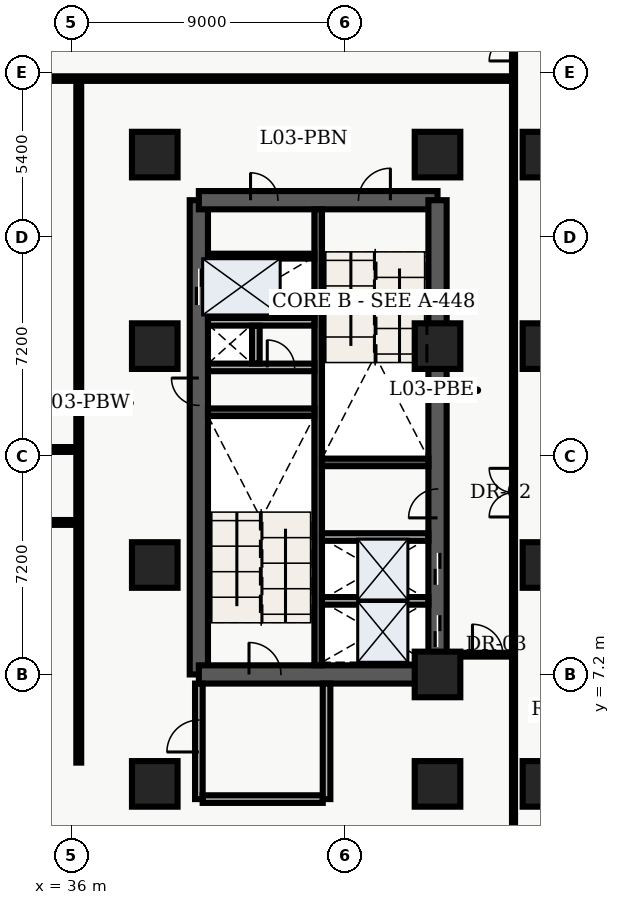
"""IFC4 building model, lengths in metres.
Left out: names, types, materials, properties, quantities, classifications, styles, units other than length and angle.
Written with IfcOpenShell. Run it as: python <this file> out.ifc"""

import sys

from ifc_helpers import new_model, entity, si_unit, converted_unit, direction, frame, origin_with_axes, origin_2d_with_axis, place, context, subcontext, project, spatial, polyline, rectangle, outline, extrude, element, fill, save


model = new_model("IFC4")
c1 = context("Model", 3, precision=1e-05, world=origin_with_axes(), true_north=direction((0.0, 1.0)))
c2 = subcontext(c1, "Body", "Model", "MODEL_VIEW")
j1 = project(units=[si_unit("LENGTHUNIT", "METRE"), converted_unit("PLANEANGLEUNIT", "DEGREE", entity("IfcPlaneAngleMeasure", 0.017), si_unit("PLANEANGLEUNIT", "RADIAN"), dimensions=[0, 0, 0, 0, 0, 0, 0])], contexts=[c1])
p1 = place(None, origin_with_axes())
s1 = spatial("IfcSite", under=j1, at=p1, CompositionType="ELEMENT")
p2 = place(p1, origin_with_axes())
s2 = spatial("IfcBuilding", under=s1, at=p2, CompositionType="ELEMENT")
p3 = place(p2, frame((0.0, 0.0, 15.3), z_axis=(0.0, 0.0, 1.0), x_axis=(1.0, 0.0, 0.0)))
s3 = spatial("IfcBuildingStorey", under=s2, at=p3, CompositionType="ELEMENT", Elevation=15.3)
p4 = place(p3, frame((40.2, 7.2, 0.0), z_axis=(0.0, 0.0, 1.0), x_axis=(0.0, 1.0, 0.0)))
e1 = element("IfcWall", 1, at=p4, inside=s3, PredefinedType="SHEAR", context=c2, shape_type="SweptSolid", body=[
    extrude(outline(polyline([(0.0, -0.3), (15.6, -0.3), (15.6, 0.3), (0.0, 0.3), (0.0, -0.3)])), origin_with_axes(), (0.0, 0.0, 1.0), 4.26),
])
p5 = place(p4, frame((12.75, 0.0, 0.0), z_axis=(0.0, 0.0, 1.0), x_axis=(1.0, 0.0, 0.0)))
e2 = element("IfcOpeningElement", 2, at=p5, cuts=e1, PredefinedType="OPENING", context=c2, shape_type="SweptSolid", body=[
    extrude(rectangle(XDim=1.2, YDim=0.62, at=origin_2d_with_axis()), origin_with_axes(), (0.0, 0.0, 1.0), 2.15),
])
p6 = place(p4, frame((9.3, 0.0, 0.0), z_axis=(0.0, 0.0, 1.0), x_axis=(1.0, 0.0, 0.0)))
e3 = element("IfcOpeningElement", 3, at=p6, cuts=e1, PredefinedType="OPENING", context=c2, shape_type="SweptSolid", body=[
    extrude(rectangle(XDim=0.9, YDim=0.62, at=origin_2d_with_axis()), origin_with_axes(), (0.0, 0.0, 1.0), 2.15),
])
p7 = place(p3, frame((40.2, 7.2, 0.0), z_axis=(0.0, 0.0, 1.0), x_axis=(1.0, 0.0, 0.0)))
e4 = element("IfcWall", 4, at=p7, inside=s3, PredefinedType="SHEAR", context=c2, shape_type="SweptSolid", body=[
    extrude(outline(polyline([(0.0, -0.3), (7.85, -0.3), (7.85, 0.3), (0.0, 0.3), (0.0, -0.3)])), origin_with_axes(), (0.0, 0.0, 1.0), 4.26),
])
p8 = place(p7, frame((2.175, 0.0, 0.0), z_axis=(0.0, 0.0, 1.0), x_axis=(1.0, 0.0, 0.0)))
e5 = element("IfcOpeningElement", 5, at=p8, cuts=e4, PredefinedType="OPENING", context=c2, shape_type="SweptSolid", body=[
    extrude(rectangle(XDim=1.05, YDim=0.62, at=origin_2d_with_axis()), origin_with_axes(), (0.0, 0.0, 1.0), 2.15),
])
p9 = place(p3, frame((40.2, 22.8, 0.0), z_axis=(0.0, 0.0, 1.0), x_axis=(1.0, 0.0, 0.0)))
e6 = element("IfcWall", 6, at=p9, inside=s3, PredefinedType="SHEAR", context=c2, shape_type="SweptSolid", body=[
    extrude(outline(polyline([(0.0, -0.3), (7.85, -0.3), (7.85, 0.3), (0.0, 0.3), (0.0, -0.3)])), origin_with_axes(), (0.0, 0.0, 1.0), 4.26),
])
p10 = place(p9, frame((5.775, 0.0, 0.0), z_axis=(0.0, 0.0, 1.0), x_axis=(1.0, 0.0, 0.0)))
e7 = element("IfcOpeningElement", 7, at=p10, cuts=e6, PredefinedType="OPENING", context=c2, shape_type="SweptSolid", body=[
    extrude(rectangle(XDim=1.05, YDim=0.62, at=origin_2d_with_axis()), origin_with_axes(), (0.0, 0.0, 1.0), 2.15),
])
p11 = place(p9, frame((2.15, 0.0, 0.0), z_axis=(0.0, 0.0, 1.0), x_axis=(1.0, 0.0, 0.0)))
e8 = element("IfcOpeningElement", 8, at=p11, cuts=e6, PredefinedType="OPENING", context=c2, shape_type="SweptSolid", body=[
    extrude(rectangle(XDim=0.9, YDim=0.62, at=origin_2d_with_axis()), origin_with_axes(), (0.0, 0.0, 1.0), 2.15),
])
p12 = place(p3, frame((48.05, 7.2, 0.0), z_axis=(0.0, 0.0, 1.0), x_axis=(0.0, 1.0, 0.0)))
e9 = element("IfcWall", 9, at=p12, inside=s3, PredefinedType="SHEAR", context=c2, shape_type="SweptSolid", body=[
    extrude(outline(polyline([(0.0, -0.3), (15.6, -0.3), (15.6, 0.3), (0.0, 0.3), (0.0, -0.3)])), origin_with_axes(), (0.0, 0.0, 1.0), 4.26),
])
p13 = place(p12, frame((1.425, 0.0, 0.0), z_axis=(0.0, 0.0, 1.0), x_axis=(1.0, 0.0, 0.0)))
e10 = element("IfcOpeningElement", 10, at=p13, cuts=e9, PredefinedType="OPENING", context=c2, shape_type="SweptSolid", body=[
    extrude(rectangle(XDim=1.05, YDim=0.62, at=origin_2d_with_axis()), origin_with_axes(), (0.0, 0.0, 1.0), 2.15),
])
p14 = place(p12, frame((3.475, 0.0, 0.0), z_axis=(0.0, 0.0, 1.0), x_axis=(1.0, 0.0, 0.0)))
e11 = element("IfcOpeningElement", 11, at=p14, cuts=e9, PredefinedType="OPENING", context=c2, shape_type="SweptSolid", body=[
    extrude(rectangle(XDim=1.05, YDim=0.62, at=origin_2d_with_axis()), origin_with_axes(), (0.0, 0.0, 1.0), 2.15),
])
p15 = place(p12, frame((5.625, 0.0, 0.0), z_axis=(0.0, 0.0, 1.0), x_axis=(1.0, 0.0, 0.0)))
e12 = element("IfcOpeningElement", 12, at=p15, cuts=e9, PredefinedType="OPENING", context=c2, shape_type="SweptSolid", body=[
    extrude(rectangle(XDim=0.95, YDim=0.62, at=origin_2d_with_axis()), origin_with_axes(), (0.0, 0.0, 1.0), 2.15),
])
p16 = place(p3, frame((44.125, 7.5, 0.0), z_axis=(0.0, 0.0, 1.0), x_axis=(0.0, 1.0, 0.0)))
e13 = element("IfcWall", 13, at=p16, inside=s3, PredefinedType="SHEAR", context=c2, shape_type="SweptSolid", body=[
    extrude(outline(polyline([(0.0, -0.125), (15.0, -0.125), (15.0, 0.125), (0.0, 0.125), (0.0, -0.125)])), origin_with_axes(), (0.0, 0.0, 1.0), 4.26),
])
for number, where, z_axis, x_axis in (
    (14, (40.5, 15.825, 0.0), (0.0, 0.0, 1.0), (1.0, 0.0, 0.0)),
    (15, (44.25, 14.175, 0.0), (0.0, 0.0, 1.0), (1.0, 0.0, 0.0)),
):
    element("IfcWall", number, at=place(p3, frame(where, z_axis=z_axis, x_axis=x_axis)), inside=s3, PredefinedType="SHEAR", context=c2, shape_type="SweptSolid", body=[
        extrude(outline(polyline([(0.0, -0.125), (3.5, -0.125), (3.5, 0.125), (0.0, 0.125), (0.0, -0.125)])), origin_with_axes(), (0.0, 0.0, 1.0), 4.26),
    ])
p17 = place(p3, frame((40.5, 17.3, 0.0), z_axis=(0.0, 0.0, 1.0), x_axis=(1.0, 0.0, 0.0)))
e16 = element("IfcWall", 16, at=p17, inside=s3, PredefinedType="SOLIDWALL", context=c2, shape_type="SweptSolid", body=[
    extrude(outline(polyline([(0.0, -0.125), (3.5, -0.125), (3.5, 0.125), (0.0, 0.125), (0.0, -0.125)])), origin_with_axes(), (0.0, 0.0, 1.0), 3.3),
])
p18 = place(p17, frame((2.4, 0.0, 0.0), z_axis=(0.0, 0.0, 1.0), x_axis=(1.0, 0.0, 0.0)))
e17 = element("IfcOpeningElement", 17, at=p18, cuts=e16, PredefinedType="OPENING", context=c2, shape_type="SweptSolid", body=[
    extrude(rectangle(XDim=0.9, YDim=0.27, at=origin_2d_with_axis()), origin_with_axes(), (0.0, 0.0, 1.0), 2.15),
])
p19 = place(p3, frame((40.5, 18.8, 0.0), z_axis=(0.0, 0.0, 1.0), x_axis=(1.0, 0.0, 0.0)))
e18 = element("IfcWall", 18, at=p19, inside=s3, PredefinedType="SOLIDWALL", context=c2, shape_type="SweptSolid", body=[
    extrude(outline(polyline([(0.0, -0.125), (3.5, -0.125), (3.5, 0.125), (0.0, 0.125), (0.0, -0.125)])), origin_with_axes(), (0.0, 0.0, 1.0), 3.3),
])
p20 = place(p3, frame((42.075, 17.43, 0.0), z_axis=(0.0, 0.0, 1.0), x_axis=(0.0, 1.0, 0.0)))
e19 = element("IfcWall", 19, at=p20, inside=s3, PredefinedType="SOLIDWALL", context=c2, shape_type="SweptSolid", body=[
    extrude(outline(polyline([(0.0, -0.125), (1.24, -0.125), (1.24, 0.125), (0.0, 0.125), (0.0, -0.125)])), origin_with_axes(), (0.0, 0.0, 1.0), 3.3),
])
p21 = place(p3, frame((40.2, 3.1, 0.0), z_axis=(0.0, 0.0, 1.0), x_axis=(0.0, 1.0, 0.0)))
e20 = element("IfcWall", 20, at=p21, inside=s3, PredefinedType="SOLIDWALL", context=c2, shape_type="SweptSolid", body=[
    extrude(outline(polyline([(0.0, -0.125), (3.8, -0.125), (3.8, 0.125), (0.0, 0.125), (0.0, -0.125)])), origin_with_axes(), (0.0, 0.0, 1.0), 3.3),
])
p22 = place(p21, frame((2.075, 0.0, 0.0), z_axis=(0.0, 0.0, 1.0), x_axis=(1.0, 0.0, 0.0)))
e21 = element("IfcOpeningElement", 21, at=p22, cuts=e20, PredefinedType="OPENING", context=c2, shape_type="SweptSolid", body=[
    extrude(rectangle(XDim=1.05, YDim=0.27, at=origin_2d_with_axis()), origin_with_axes(), (0.0, 0.0, 1.0), 2.15),
])
p23 = place(p3, frame((40.325, 3.1, 0.0), z_axis=(0.0, 0.0, 1.0), x_axis=(1.0, 0.0, 0.0)))
e22 = element("IfcWall", 22, at=p23, inside=s3, PredefinedType="SOLIDWALL", context=c2, shape_type="SweptSolid", body=[
    extrude(outline(polyline([(0.0, -0.125), (3.95, -0.125), (3.95, 0.125), (0.0, 0.125), (0.0, -0.125)])), origin_with_axes(), (0.0, 0.0, 1.0), 3.3),
])
p24 = place(p3, frame((44.4, 3.1, 0.0), z_axis=(0.0, 0.0, 1.0), x_axis=(0.0, 1.0, 0.0)))
e23 = element("IfcWall", 23, at=p24, inside=s3, PredefinedType="SOLIDWALL", context=c2, shape_type="SweptSolid", body=[
    extrude(outline(polyline([(0.0, -0.125), (3.8, -0.125), (3.8, 0.125), (0.0, 0.125), (0.0, -0.125)])), origin_with_axes(), (0.0, 0.0, 1.0), 3.3),
])
for number, where, z_axis, x_axis in (
    (24, (38.75, 3.6, 0.0), (0.0, 0.0, 1.0), (1.0, 0.0, 0.0)),
    (25, (38.75, 10.8, 0.0), (0.0, 0.0, 1.0), (1.0, 0.0, 0.0)),
    (26, (38.75, 18.0, 0.0), (0.0, 0.0, 1.0), (1.0, 0.0, 0.0)),
    (27, (38.75, 24.3, 0.0), (0.0, 0.0, 1.0), (1.0, 0.0, 0.0)),
    (28, (48.05, 3.6, 0.0), (0.0, 0.0, 1.0), (1.0, 0.0, 0.0)),
    (29, (48.05, 7.2, 0.0), (0.0, 0.0, 1.0), (1.0, 0.0, 0.0)),
    (30, (48.05, 18.0, 0.0), (0.0, 0.0, 1.0), (1.0, 0.0, 0.0)),
    (31, (48.05, 24.3, 0.0), (0.0, 0.0, 1.0), (1.0, 0.0, 0.0)),
    (32, (51.6, 3.6, 0.0), (0.0, 0.0, 1.0), (1.0, 0.0, 0.0)),
    (33, (51.6, 10.8, 0.0), (0.0, 0.0, 1.0), (1.0, 0.0, 0.0)),
    (34, (51.6, 18.0, 0.0), (0.0, 0.0, 1.0), (1.0, 0.0, 0.0)),
    (35, (51.6, 24.3, 0.0), (0.0, 0.0, 1.0), (1.0, 0.0, 0.0)),
):
    element("IfcColumn", number, at=place(p3, frame(where, z_axis=z_axis, x_axis=x_axis)), inside=s3, PredefinedType="COLUMN", context=c2, shape_type="SweptSolid", body=[
        extrude(rectangle(XDim=1.5, YDim=1.5, at=origin_2d_with_axis()), origin_with_axes(), (0.0, 0.0, 1.0), 4.5),
    ])
p25 = place(p3, frame((40.5, 20.96, 0.0), z_axis=(0.0, 0.0, 1.0), x_axis=(1.0, 0.0, 0.0)))
e36 = element("IfcWall", 36, at=p25, inside=s3, PredefinedType="PARTITIONING", context=c2, shape_type="SweptSolid", body=[
    extrude(outline(polyline([(0.0, -0.08), (3.5, -0.08), (3.5, 0.08), (0.0, 0.08), (0.0, -0.08)])), origin_with_axes(), (0.0, 0.0, 1.0), 3.2),
])
for number, where, z_axis, x_axis in (
    (37, (44.25, 9.62, 0.0), (0.0, 0.0, 1.0), (1.0, 0.0, 0.0)),
    (38, (44.25, 11.72, 0.0), (0.0, 0.0, 1.0), (1.0, 0.0, 0.0)),
):
    element("IfcWall", number, at=place(p3, frame(where, z_axis=z_axis, x_axis=x_axis)), inside=s3, PredefinedType="SOLIDWALL", context=c2, shape_type="SweptSolid", body=[
        extrude(outline(polyline([(0.0, -0.125), (3.5, -0.125), (3.5, 0.125), (0.0, 0.125), (0.0, -0.125)])), origin_with_axes(), (0.0, 0.0, 1.0), 3.2),
    ])
p26 = place(p3, frame((21.3, 12.2, 0.0), z_axis=(0.0, 0.0, 1.0), x_axis=(1.0, 0.0, 0.0)))
e39 = element("IfcWall", 39, at=p26, inside=s3, PredefinedType="PARTITIONING", context=c2, shape_type="SweptSolid", body=[
    extrude(outline(polyline([(0.0, -0.08), (14.95, -0.08), (14.95, 0.08), (0.0, 0.08), (0.0, -0.08)])), origin_with_axes(), (0.0, 0.0, 1.0), 3.2),
])
p27 = place(p26, frame((8.25, 0.0, 0.0), z_axis=(0.0, 0.0, 1.0), x_axis=(1.0, 0.0, 0.0)))
e40 = element("IfcOpeningElement", 40, at=p27, cuts=e39, PredefinedType="OPENING", context=c2, shape_type="SweptSolid", body=[
    extrude(rectangle(XDim=1.5, YDim=0.18, at=origin_2d_with_axis()), origin_with_axes(), (0.0, 0.0, 1.0), 2.2),
])
p28 = place(p3, frame((21.3, 14.6, 0.0), z_axis=(0.0, 0.0, 1.0), x_axis=(1.0, 0.0, 0.0)))
e41 = element("IfcWall", 41, at=p28, inside=s3, PredefinedType="PARTITIONING", context=c2, shape_type="SweptSolid", body=[
    extrude(outline(polyline([(0.0, -0.08), (14.95, -0.08), (14.95, 0.08), (0.0, 0.08), (0.0, -0.08)])), origin_with_axes(), (0.0, 0.0, 1.0), 3.2),
])
p29 = place(p28, frame((8.25, 0.0, 0.0), z_axis=(0.0, 0.0, 1.0), x_axis=(1.0, 0.0, 0.0)))
e42 = element("IfcOpeningElement", 42, at=p29, cuts=e41, PredefinedType="OPENING", context=c2, shape_type="SweptSolid", body=[
    extrude(rectangle(XDim=1.5, YDim=0.18, at=origin_2d_with_axis()), origin_with_axes(), (0.0, 0.0, 1.0), 2.2),
])
p30 = place(p3, frame((36.25, 4.3, 0.0), z_axis=(0.0, 0.0, 1.0), x_axis=(0.0, 1.0, 0.0)))
e43 = element("IfcWall", 43, at=p30, inside=s3, PredefinedType="PARTITIONING", context=c2, shape_type="SweptSolid", body=[
    extrude(outline(polyline([(0.0, -0.08), (22.5, -0.08), (22.5, 0.08), (0.0, 0.08), (0.0, -0.08)])), origin_with_axes(), (0.0, 0.0, 1.0), 3.2),
])
p31 = place(p3, frame((50.55, 0.38, 0.0), z_axis=(0.0, 0.0, 1.0), x_axis=(0.0, 1.0, 0.0)))
e44 = element("IfcWall", 44, at=p31, inside=s3, PredefinedType="PARTITIONING", context=c2, shape_type="SweptSolid", body=[
    extrude(outline(polyline([(0.0, -0.05), (38.84, -0.05), (38.84, 0.05), (0.0, 0.05), (0.0, -0.05)])), origin_with_axes(), (0.0, 0.0, 1.0), 3.2),
])
p32 = place(p31, frame((12.8, 0.0, 0.0), z_axis=(0.0, 0.0, 1.0), x_axis=(1.0, 0.0, 0.0)))
e45 = element("IfcOpeningElement", 45, at=p32, cuts=e44, PredefinedType="OPENING", context=c2, shape_type="SweptSolid", body=[
    extrude(rectangle(XDim=1.6, YDim=0.12, at=origin_2d_with_axis()), origin_with_axes(), (0.0, 0.0, 1.0), 2.2),
])
p33 = place(p31, frame((27.8, 0.0, 0.0), z_axis=(0.0, 0.0, 1.0), x_axis=(1.0, 0.0, 0.0)))
e46 = element("IfcOpeningElement", 46, at=p33, cuts=e44, PredefinedType="OPENING", context=c2, shape_type="SweptSolid", body=[
    extrude(rectangle(XDim=1.6, YDim=0.12, at=origin_2d_with_axis()), origin_with_axes(), (0.0, 0.0, 1.0), 2.2),
])
p34 = place(p3, frame((48.05, 7.85, 0.0), z_axis=(0.0, 0.0, 1.0), x_axis=(1.0, 0.0, 0.0)))
e47 = element("IfcWall", 47, at=p34, inside=s3, PredefinedType="PARTITIONING", context=c2, shape_type="SweptSolid", body=[
    extrude(outline(polyline([(0.0, -0.062), (2.5, -0.062), (2.5, 0.062), (0.0, 0.062), (0.0, -0.062)])), origin_with_axes(), (0.0, 0.0, 1.0), 3.2),
])
p35 = place(p34, frame((1.65, 0.0, 0.0), z_axis=(0.0, 0.0, 1.0), x_axis=(1.0, 0.0, 0.0)))
e48 = element("IfcOpeningElement", 48, at=p35, cuts=e47, PredefinedType="OPENING", context=c2, shape_type="SweptSolid", body=[
    extrude(rectangle(XDim=1.0, YDim=0.145, at=origin_2d_with_axis()), origin_with_axes(), (0.0, 0.0, 1.0), 2.15),
])
p36 = place(p3, frame((21.3, 26.8, 0.0), z_axis=(0.0, 0.0, 1.0), x_axis=(1.0, 0.0, 0.0)))
e49 = element("IfcWall", 49, at=p36, inside=s3, PredefinedType="PARTITIONING", context=c2, shape_type="SweptSolid", body=[
    extrude(outline(polyline([(0.0, -0.075), (29.25, -0.075), (29.25, 0.075), (0.0, 0.075), (0.0, -0.075)])), origin_with_axes(), (0.0, 0.0, 1.0), 3.2),
])
p37 = place(p12, frame((1.425, 0.0, 0.0), z_axis=(0.0, 0.0, 1.0), x_axis=(1.0, 0.0, 0.0)))
e50 = element("IfcDoor", 50, at=p37, inside=s3, OperationType="SLIDING_TO_LEFT", PredefinedType="DOOR", context=c2, shape_type="SweptSolid", body=[
    extrude(rectangle(XDim=1.05, YDim=0.09, at=origin_2d_with_axis()), origin_with_axes(), (0.0, 0.0, 1.0), 2.15),
])
fill(e10, e50)
p38 = place(p12, frame((3.475, 0.0, 0.0), z_axis=(0.0, 0.0, 1.0), x_axis=(1.0, 0.0, 0.0)))
e51 = element("IfcDoor", 51, at=p38, inside=s3, OperationType="SLIDING_TO_RIGHT", PredefinedType="DOOR", context=c2, shape_type="SweptSolid", body=[
    extrude(rectangle(XDim=1.05, YDim=0.09, at=origin_2d_with_axis()), origin_with_axes(), (0.0, 0.0, 1.0), 2.15),
])
fill(e11, e51)
p39 = place(p4, frame((12.75, 0.0, 0.0), z_axis=(0.0, 0.0, 1.0), x_axis=(1.0, 0.0, 0.0)))
e52 = element("IfcDoor", 52, at=p39, inside=s3, OperationType="DOUBLE_DOOR_SLIDING", PredefinedType="DOOR", context=c2, shape_type="SweptSolid", body=[
    extrude(rectangle(XDim=1.2, YDim=0.09, at=origin_2d_with_axis()), origin_with_axes(), (0.0, 0.0, 1.0), 2.15),
])
fill(e2, e52)
p40 = place(p4, frame((9.3, 0.0, 0.0), z_axis=(0.0, 0.0, 1.0), x_axis=(1.0, 0.0, 0.0)))
e53 = element("IfcDoor", 53, at=p40, inside=s3, OperationType="SINGLE_SWING_RIGHT", PredefinedType="DOOR", context=c2, shape_type="SweptSolid", body=[
    extrude(rectangle(XDim=0.9, YDim=0.09, at=origin_2d_with_axis()), origin_with_axes(), (0.0, 0.0, 1.0), 2.15),
])
fill(e3, e53)
p41 = place(p17, frame((2.4, 0.0, 0.0), z_axis=(0.0, 0.0, 1.0), x_axis=(1.0, 0.0, 0.0)))
e54 = element("IfcDoor", 54, at=p41, inside=s3, OperationType="SINGLE_SWING_LEFT", PredefinedType="DOOR", context=c2, shape_type="SweptSolid", body=[
    extrude(rectangle(XDim=0.9, YDim=0.09, at=origin_2d_with_axis()), origin_with_axes(), (0.0, 0.0, 1.0), 2.15),
])
fill(e17, e54)
p42 = place(p7, frame((2.175, 0.0, 0.0), z_axis=(0.0, 0.0, 1.0), x_axis=(1.0, 0.0, 0.0)))
e55 = element("IfcDoor", 55, at=p42, inside=s3, OperationType="SINGLE_SWING_LEFT", PredefinedType="DOOR", context=c2, shape_type="SweptSolid", body=[
    extrude(rectangle(XDim=1.05, YDim=0.09, at=origin_2d_with_axis()), origin_with_axes(), (0.0, 0.0, 1.0), 2.15),
])
fill(e5, e55)
p43 = place(p9, frame((5.775, 0.0, 0.0), z_axis=(0.0, 0.0, 1.0), x_axis=(1.0, 0.0, 0.0)))
e56 = element("IfcDoor", 56, at=p43, inside=s3, OperationType="SINGLE_SWING_RIGHT", PredefinedType="DOOR", context=c2, shape_type="SweptSolid", body=[
    extrude(rectangle(XDim=1.05, YDim=0.09, at=origin_2d_with_axis()), origin_with_axes(), (0.0, 0.0, 1.0), 2.15),
])
fill(e7, e56)
p44 = place(p21, frame((2.075, 0.0, 0.0), z_axis=(0.0, 0.0, 1.0), x_axis=(1.0, 0.0, 0.0)))
e57 = element("IfcDoor", 57, at=p44, inside=s3, OperationType="SINGLE_SWING_LEFT", PredefinedType="DOOR", context=c2, shape_type="SweptSolid", body=[
    extrude(rectangle(XDim=1.05, YDim=0.09, at=origin_2d_with_axis()), origin_with_axes(), (0.0, 0.0, 1.0), 2.15),
])
fill(e21, e57)
p45 = place(p9, frame((2.15, 0.0, 0.0), z_axis=(0.0, 0.0, 1.0), x_axis=(1.0, 0.0, 0.0)))
e58 = element("IfcDoor", 58, at=p45, inside=s3, OperationType="SINGLE_SWING_LEFT", PredefinedType="DOOR", context=c2, shape_type="SweptSolid", body=[
    extrude(rectangle(XDim=0.9, YDim=0.09, at=origin_2d_with_axis()), origin_with_axes(), (0.0, 0.0, 1.0), 2.15),
])
fill(e8, e58)
p46 = place(p12, frame((5.625, 0.0, 0.0), z_axis=(0.0, 0.0, 1.0), x_axis=(1.0, 0.0, 0.0)))
e59 = element("IfcDoor", 59, at=p46, inside=s3, OperationType="SINGLE_SWING_LEFT", PredefinedType="DOOR", context=c2, shape_type="SweptSolid", body=[
    extrude(rectangle(XDim=0.95, YDim=0.09, at=origin_2d_with_axis()), origin_with_axes(), (0.0, 0.0, 1.0), 2.15),
])
fill(e12, e59)
p47 = place(p34, frame((1.65, 0.0, 0.0), z_axis=(0.0, 0.0, 1.0), x_axis=(1.0, 0.0, 0.0)))
e60 = element("IfcDoor", 60, at=p47, inside=s3, OperationType="SINGLE_SWING_LEFT", PredefinedType="DOOR", context=c2, shape_type="SweptSolid", body=[
    extrude(rectangle(XDim=1.0, YDim=0.075, at=origin_2d_with_axis()), origin_with_axes(), (0.0, 0.0, 1.0), 2.15),
])
fill(e48, e60)
p48 = place(p31, frame((12.8, 0.0, 0.0), z_axis=(0.0, 0.0, 1.0), x_axis=(1.0, 0.0, 0.0)))
e61 = element("IfcDoor", 61, at=p48, inside=s3, OperationType="DOUBLE_DOOR_SINGLE_SWING", PredefinedType="DOOR", context=c2, shape_type="SweptSolid", body=[
    extrude(rectangle(XDim=1.6, YDim=0.06, at=origin_2d_with_axis()), origin_with_axes(), (0.0, 0.0, 1.0), 2.2),
])
fill(e45, e61)
p49 = place(p31, frame((27.8, 0.0, 0.0), z_axis=(0.0, 0.0, 1.0), x_axis=(1.0, 0.0, 0.0)))
e62 = element("IfcDoor", 62, at=p49, inside=s3, OperationType="DOUBLE_DOOR_SINGLE_SWING", PredefinedType="DOOR", context=c2, shape_type="SweptSolid", body=[
    extrude(rectangle(XDim=1.6, YDim=0.06, at=origin_2d_with_axis()), origin_with_axes(), (0.0, 0.0, 1.0), 2.2),
])
fill(e46, e62)
save(model, sys.argv[1])
